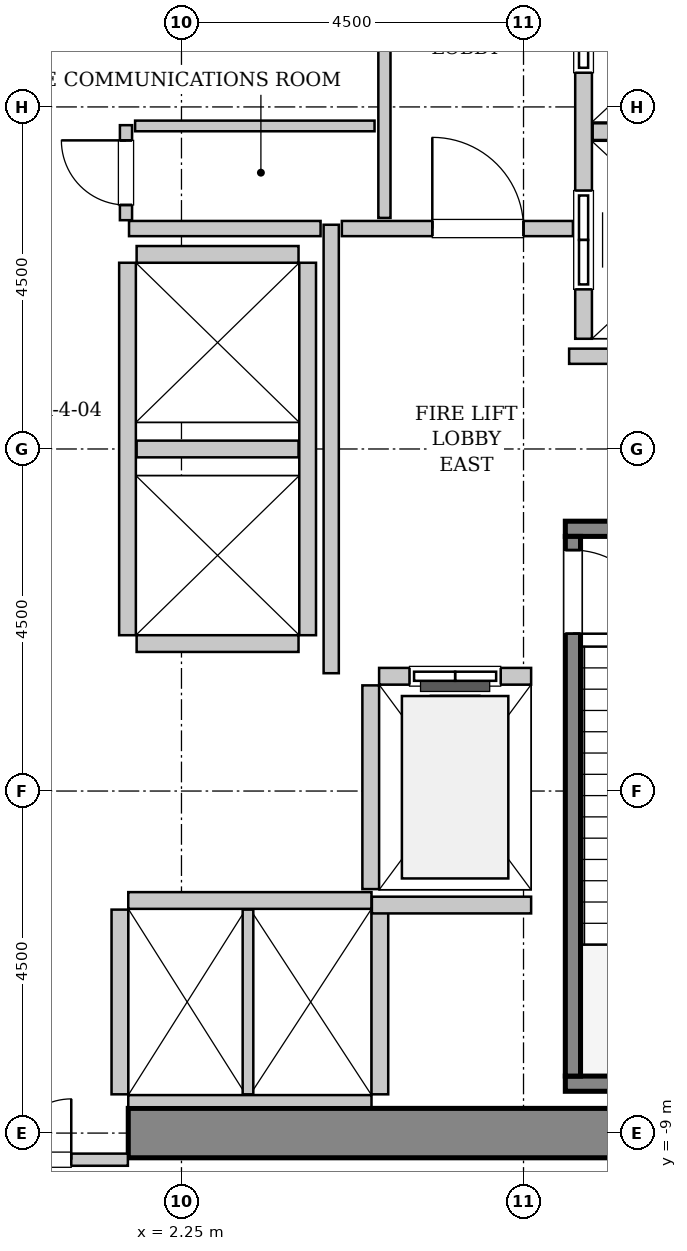
"""IFC4 building model, lengths in metres.
Left out: names, types, materials, properties, quantities, classifications, styles, units other than length and angle.
Written with IfcOpenShell. Run it as: python <this file> out.ifc"""

import sys

from ifc_helpers import new_model, si_unit, direction, frame, frame_2d, origin, place, context, subcontext, project, spatial, rectangle, extrude, source, transform, mapped, element, fill, save


model = new_model("IFC4")
c1 = context("Model", 3, precision=1e-05, world=origin(), true_north=direction((0.0, 1.0)))
c2 = subcontext(c1, "Body", "Model", "MODEL_VIEW")
j1 = project(units=[si_unit("LENGTHUNIT", "METRE"), si_unit("PLANEANGLEUNIT", "RADIAN")], contexts=[c1])
p1 = place(None, origin())
s1 = spatial("IfcSite", under=j1, at=p1, CompositionType="ELEMENT")
p2 = place(p1, origin())
s2 = spatial("IfcBuilding", under=s1, at=p2, CompositionType="ELEMENT")
p3 = place(p2, frame((0.0, 0.0, 16.8)))
s3 = spatial("IfcBuildingStorey", under=s2, at=p3, CompositionType="ELEMENT", Elevation=16.8)
m1 = source(origin(), c2, "Body", "SweptSolid", [
    extrude(rectangle(XDim=10.025, YDim=0.65, at=frame_2d((5.012, 0.0))), origin(), (0.0, 0.0, 1.0), 5.4),
])
p4 = place(p3, frame((1.55, -9.0, 0.0), z_axis=(0.0, 0.0, 1.0), x_axis=(1.0, 0.0, 0.0)))
e1 = element("IfcWall", 1, at=p4, inside=s3, PredefinedType="SHEAR", context=c2, shape_type="MappedRepresentation", body=[
    mapped(m1, transform((0.0, 0.0, 0.0), x_axis=(1.0, 0.0, 0.0), y_axis=(0.0, 1.0, 0.0), z_axis=(0.0, 0.0, 1.0), scale=1.0)),
])
m2 = source(origin(), c2, "Body", "SweptSolid", [
    extrude(rectangle(XDim=3.4, YDim=0.2, at=frame_2d((1.7, 0.0))), origin(), (0.0, 0.0, 1.0), 5.4),
])
p5 = place(p3, frame((7.3, -1.05, 0.0), z_axis=(0.0, 0.0, 1.0), x_axis=(1.0, 0.0, 0.0)))
e2 = element("IfcWall", 2, at=p5, inside=s3, PredefinedType="SOLIDWALL", context=c2, shape_type="MappedRepresentation", body=[
    mapped(m2, transform((0.0, 0.0, 0.0), x_axis=(1.0, 0.0, 0.0), y_axis=(0.0, 1.0, 0.0), z_axis=(0.0, 0.0, 1.0), scale=1.0)),
])
m3 = source(origin(), c2, "Body", "SweptSolid", [
    extrude(rectangle(XDim=3.63, YDim=0.2, at=frame_2d((1.815, 0.0))), origin(), (0.0, 0.0, 1.0), 5.4),
])
p6 = place(p3, frame((7.3, -8.35, 0.0), z_axis=(0.0, 0.0, 1.0), x_axis=(1.0, 0.0, 0.0)))
e3 = element("IfcWall", 3, at=p6, inside=s3, PredefinedType="SOLIDWALL", context=c2, shape_type="MappedRepresentation", body=[
    mapped(m3, transform((0.0, 0.0, 0.0), x_axis=(1.0, 0.0, 0.0), y_axis=(0.0, 1.0, 0.0), z_axis=(0.0, 0.0, 1.0), scale=1.0)),
])
m4 = source(origin(), c2, "Body", "SweptSolid", [
    extrude(rectangle(XDim=7.1, YDim=0.2, at=frame_2d((3.55, 0.0))), origin(), (0.0, 0.0, 1.0), 5.4),
])
p7 = place(p3, frame((7.4, -1.15, 0.0), z_axis=(0.0, 0.0, 1.0), x_axis=(0.0, -1.0, 0.0)))
e4 = element("IfcWall", 4, at=p7, inside=s3, PredefinedType="SOLIDWALL", context=c2, shape_type="MappedRepresentation", body=[
    mapped(m4, transform((0.0, 0.0, 0.0), x_axis=(1.0, 0.0, 0.0), y_axis=(0.0, 1.0, 0.0), z_axis=(0.0, 0.0, 1.0), scale=1.0)),
])
p8 = place(p7, frame((0.18, 0.0, 0.0)))
e5 = element("IfcOpeningElement", 5, at=p8, cuts=e4, PredefinedType="OPENING", context=c2, shape_type="SweptSolid", body=[
    extrude(rectangle(XDim=1.1, YDim=2.15, at=frame_2d((0.55, 1.075))), frame((0.0, 0.11, 0.0), z_axis=(0.0, -1.0, 0.0), x_axis=(1.0, 0.0, 0.0)), (0.0, 0.0, 1.0), 0.22),
])
m5 = source(origin(), c2, "Body", "SweptSolid", [
    extrude(rectangle(XDim=2.0, YDim=0.22, at=frame_2d((1.0, 0.0))), origin(), (0.0, 0.0, 1.0), 5.085),
])
p9 = place(p3, frame((6.85, -2.99, 0.0), z_axis=(0.0, 0.0, 1.0), x_axis=(-1.0, 0.0, 0.0)))
e6 = element("IfcWall", 6, at=p9, inside=s3, PredefinedType="SOLIDWALL", context=c2, shape_type="MappedRepresentation", body=[
    mapped(m5, transform((0.0, 0.0, 0.0), x_axis=(1.0, 0.0, 0.0), y_axis=(0.0, 1.0, 0.0), z_axis=(0.0, 0.0, 1.0), scale=1.0)),
])
p10 = place(p9, frame((0.4, 0.0, 0.0)))
e7 = element("IfcOpeningElement", 7, at=p10, cuts=e6, PredefinedType="OPENING", context=c2, shape_type="SweptSolid", body=[
    extrude(rectangle(XDim=1.2, YDim=2.2, at=frame_2d((0.6, 1.1))), frame((0.0, 0.12, 0.0), z_axis=(0.0, -1.0, 0.0), x_axis=(1.0, 0.0, 0.0)), (0.0, 0.0, 1.0), 0.24),
])
m6 = source(origin(), c2, "Body", "SweptSolid", [
    extrude(rectangle(XDim=2.68, YDim=0.22, at=frame_2d((1.34, 0.0))), origin(), (0.0, 0.0, 1.0), 5.085),
])
p11 = place(p3, frame((4.74, -3.11, 0.0), z_axis=(0.0, 0.0, 1.0), x_axis=(0.0, -1.0, 0.0)))
e8 = element("IfcWall", 8, at=p11, inside=s3, PredefinedType="SOLIDWALL", context=c2, shape_type="MappedRepresentation", body=[
    mapped(m6, transform((0.0, 0.0, 0.0), x_axis=(1.0, 0.0, 0.0), y_axis=(0.0, 1.0, 0.0), z_axis=(0.0, 0.0, 1.0), scale=1.0)),
])
m7 = source(origin(), c2, "Body", "SweptSolid", [
    extrude(rectangle(XDim=5.45, YDim=0.22, at=frame_2d((2.725, 0.0))), origin(), (0.0, 0.0, 1.0), 5.085),
])
p12 = place(p3, frame((7.54, 6.9, 0.0), z_axis=(0.0, 0.0, 1.0), x_axis=(0.0, -1.0, 0.0)))
e9 = element("IfcWall", 9, at=p12, inside=s3, PredefinedType="SOLIDWALL", context=c2, shape_type="MappedRepresentation", body=[
    mapped(m7, transform((0.0, 0.0, 0.0), x_axis=(1.0, 0.0, 0.0), y_axis=(0.0, 1.0, 0.0), z_axis=(0.0, 0.0, 1.0), scale=1.0)),
])
p13 = place(p12, frame((3.5, 0.0, 0.0)))
e10 = element("IfcOpeningElement", 10, at=p13, cuts=e9, PredefinedType="OPENING", context=c2, shape_type="SweptSolid", body=[
    extrude(rectangle(XDim=1.3, YDim=2.3, at=frame_2d((0.65, 1.15))), frame((0.0, 0.12, 0.0), z_axis=(0.0, -1.0, 0.0), x_axis=(1.0, 0.0, 0.0)), (0.0, 0.0, 1.0), 0.24),
])
p14 = place(p12, frame((0.65, 0.0, 0.0)))
e11 = element("IfcOpeningElement", 11, at=p14, cuts=e9, PredefinedType="OPENING", context=c2, shape_type="SweptSolid", body=[
    extrude(rectangle(XDim=1.3, YDim=2.3, at=frame_2d((0.65, 1.15))), frame((0.0, 0.12, 0.0), z_axis=(0.0, -1.0, 0.0), x_axis=(1.0, 0.0, 0.0)), (0.0, 0.0, 1.0), 0.24),
])
m8 = source(origin(), c2, "Body", "SweptSolid", [
    extrude(rectangle(XDim=2.78, YDim=0.22, at=frame_2d((1.39, 0.0))), origin(), (0.0, 0.0, 1.0), 5.085),
])
p15 = place(p3, frame((7.66, 4.175, 0.0), z_axis=(0.0, 0.0, 1.0), x_axis=(1.0, 0.0, 0.0)))
e12 = element("IfcWall", 12, at=p15, inside=s3, PredefinedType="SOLIDWALL", context=c2, shape_type="MappedRepresentation", body=[
    mapped(m8, transform((0.0, 0.0, 0.0), x_axis=(1.0, 0.0, 0.0), y_axis=(0.0, 1.0, 0.0), z_axis=(0.0, 0.0, 1.0), scale=1.0)),
])
m9 = source(origin(), c2, "Body", "SweptSolid", [
    extrude(rectangle(XDim=3.2, YDim=0.22, at=frame_2d((1.6, 0.0))), origin(), (0.0, 0.0, 1.0), 5.085),
])
p16 = place(p3, frame((4.75, -5.94, 0.0), z_axis=(0.0, 0.0, 1.0), x_axis=(-1.0, 0.0, 0.0)))
e13 = element("IfcWall", 13, at=p16, inside=s3, PredefinedType="SOLIDWALL", context=c2, shape_type="MappedRepresentation", body=[
    mapped(m9, transform((0.0, 0.0, 0.0), x_axis=(1.0, 0.0, 0.0), y_axis=(0.0, 1.0, 0.0), z_axis=(0.0, 0.0, 1.0), scale=1.0)),
])
m10 = source(origin(), c2, "Body", "SweptSolid", [
    extrude(rectangle(XDim=3.2, YDim=0.16, at=frame_2d((1.6, 0.0))), origin(), (0.0, 0.0, 1.0), 3.975),
])
p17 = place(p3, frame((1.55, -8.58, 0.0), z_axis=(0.0, 0.0, 1.0), x_axis=(1.0, 0.0, 0.0)))
e14 = element("IfcWall", 14, at=p17, inside=s3, PredefinedType="PARTITIONING", context=c2, shape_type="MappedRepresentation", body=[
    mapped(m10, transform((0.0, 0.0, 0.0), x_axis=(1.0, 0.0, 0.0), y_axis=(0.0, 1.0, 0.0), z_axis=(0.0, 0.0, 1.0), scale=1.0)),
])
m11 = source(origin(), c2, "Body", "SweptSolid", [
    extrude(rectangle(XDim=2.43, YDim=0.22, at=frame_2d((1.215, 0.0))), origin(), (0.0, 0.0, 1.0), 5.085),
])
p18 = place(p3, frame((1.44, -6.06, 0.0), z_axis=(0.0, 0.0, 1.0), x_axis=(0.0, -1.0, 0.0)))
e15 = element("IfcWall", 15, at=p18, inside=s3, PredefinedType="SOLIDWALL", context=c2, shape_type="MappedRepresentation", body=[
    mapped(m11, transform((0.0, 0.0, 0.0), x_axis=(1.0, 0.0, 0.0), y_axis=(0.0, 1.0, 0.0), z_axis=(0.0, 0.0, 1.0), scale=1.0)),
])
m12 = source(origin(), c2, "Body", "SweptSolid", [
    extrude(rectangle(XDim=2.43, YDim=0.14, at=frame_2d((1.215, 0.0))), origin(), (0.0, 0.0, 1.0), 5.085),
])
p19 = place(p3, frame((3.125, -8.49, 0.0), z_axis=(0.0, 0.0, 1.0), x_axis=(0.0, 1.0, 0.0)))
e16 = element("IfcWall", 16, at=p19, inside=s3, PredefinedType="PARTITIONING", context=c2, shape_type="MappedRepresentation", body=[
    mapped(m12, transform((0.0, 0.0, 0.0), x_axis=(1.0, 0.0, 0.0), y_axis=(0.0, 1.0, 0.0), z_axis=(0.0, 0.0, 1.0), scale=1.0)),
])
p20 = place(p3, frame((4.86, -8.49, 0.0), z_axis=(0.0, 0.0, 1.0), x_axis=(0.0, 1.0, 0.0)))
e17 = element("IfcWall", 17, at=p20, inside=s3, PredefinedType="SOLIDWALL", context=c2, shape_type="MappedRepresentation", body=[
    mapped(m11, transform((0.0, 0.0, 0.0), x_axis=(1.0, 0.0, 0.0), y_axis=(0.0, 1.0, 0.0), z_axis=(0.0, 0.0, 1.0), scale=1.0)),
])
m13 = source(origin(), c2, "Body", "SweptSolid", [
    extrude(rectangle(XDim=4.9, YDim=0.22, at=frame_2d((2.45, 0.0))), origin(), (0.0, 0.0, 1.0), 5.085),
])
for number, where, z_axis, x_axis in (
    (18, (1.54, 2.45, 0.0), (0.0, 0.0, 1.0), (0.0, -1.0, 0.0)),
    (19, (3.91, -2.45, 0.0), (0.0, 0.0, 1.0), (0.0, 1.0, 0.0)),
):
    element("IfcWall", number, at=place(p3, frame(where, z_axis=z_axis, x_axis=x_axis)), inside=s3, PredefinedType="SOLIDWALL", context=c2, shape_type="MappedRepresentation", body=[
        mapped(m13, transform((0.0, 0.0, 0.0), x_axis=(1.0, 0.0, 0.0), y_axis=(0.0, 1.0, 0.0), z_axis=(0.0, 0.0, 1.0), scale=1.0)),
    ])
m14 = source(origin(), c2, "Body", "SweptSolid", [
    extrude(rectangle(XDim=2.13, YDim=0.22, at=frame_2d((1.065, 0.0))), origin(), (0.0, 0.0, 1.0), 5.085),
])
for number, where, z_axis, x_axis in (
    (20, (1.66, -2.56, 0.0), (0.0, 0.0, 1.0), (1.0, 0.0, 0.0)),
    (21, (1.66, 0.0, 0.0), (0.0, 0.0, 1.0), (1.0, 0.0, 0.0)),
    (22, (3.79, 2.56, 0.0), (0.0, 0.0, 1.0), (-1.0, 0.0, 0.0)),
):
    element("IfcWall", number, at=place(p3, frame(where, z_axis=z_axis, x_axis=x_axis)), inside=s3, PredefinedType="SOLIDWALL", context=c2, shape_type="MappedRepresentation", body=[
        mapped(m14, transform((0.0, 0.0, 0.0), x_axis=(1.0, 0.0, 0.0), y_axis=(0.0, 1.0, 0.0), z_axis=(0.0, 0.0, 1.0), scale=1.0)),
    ])
m15 = source(origin(), c2, "Body", "SweptSolid", [
    extrude(rectangle(XDim=2.095, YDim=0.22, at=frame_2d((1.048, 0.0))), origin(), (0.0, 0.0, 1.0), 5.085),
])
p21 = place(p3, frame((4.755, -6.0, 0.0), z_axis=(0.0, 0.0, 1.0), x_axis=(1.0, 0.0, 0.0)))
e23 = element("IfcWall", 23, at=p21, inside=s3, PredefinedType="SOLIDWALL", context=c2, shape_type="MappedRepresentation", body=[
    mapped(m15, transform((0.0, 0.0, 0.0), x_axis=(1.0, 0.0, 0.0), y_axis=(0.0, 1.0, 0.0), z_axis=(0.0, 0.0, 1.0), scale=1.0)),
])
m16 = source(origin(), c2, "Body", "SweptSolid", [
    extrude(rectangle(XDim=5.9, YDim=0.2, at=frame_2d((2.95, 0.0))), origin(), (0.0, 0.0, 1.0), 5.085),
])
p22 = place(p3, frame((4.22, -2.95, 0.0), z_axis=(0.0, 0.0, 1.0), x_axis=(0.0, 1.0, 0.0)))
e24 = element("IfcWall", 24, at=p22, inside=s3, PredefinedType="PARTITIONING", context=c2, shape_type="MappedRepresentation", body=[
    mapped(m16, transform((0.0, 0.0, 0.0), x_axis=(1.0, 0.0, 0.0), y_axis=(0.0, 1.0, 0.0), z_axis=(0.0, 0.0, 1.0), scale=1.0)),
])
m17 = source(origin(), c2, "Body", "SweptSolid", [
    extrude(rectangle(XDim=2.52, YDim=0.2, at=frame_2d((1.26, 0.0))), origin(), (0.0, 0.0, 1.0), 5.085),
])
p23 = place(p3, frame((1.56, 2.9, 0.0), z_axis=(0.0, 0.0, 1.0), x_axis=(1.0, 0.0, 0.0)))
e25 = element("IfcWall", 25, at=p23, inside=s3, PredefinedType="PARTITIONING", context=c2, shape_type="MappedRepresentation", body=[
    mapped(m17, transform((0.0, 0.0, 0.0), x_axis=(1.0, 0.0, 0.0), y_axis=(0.0, 1.0, 0.0), z_axis=(0.0, 0.0, 1.0), scale=1.0)),
])
m18 = source(origin(), c2, "Body", "SweptSolid", [
    extrude(rectangle(XDim=3.04, YDim=0.2, at=frame_2d((1.52, 0.0))), origin(), (0.0, 0.0, 1.0), 5.085),
])
p24 = place(p3, frame((4.36, 2.9, 0.0), z_axis=(0.0, 0.0, 1.0), x_axis=(1.0, 0.0, 0.0)))
e26 = element("IfcWall", 26, at=p24, inside=s3, PredefinedType="PARTITIONING", context=c2, shape_type="MappedRepresentation", body=[
    mapped(m18, transform((0.0, 0.0, 0.0), x_axis=(1.0, 0.0, 0.0), y_axis=(0.0, 1.0, 0.0), z_axis=(0.0, 0.0, 1.0), scale=1.0)),
])
p25 = place(p24, frame((1.19, 0.0, 0.0)))
e27 = element("IfcOpeningElement", 27, at=p25, cuts=e26, PredefinedType="OPENING", context=c2, shape_type="SweptSolid", body=[
    extrude(rectangle(XDim=1.2, YDim=2.15, at=frame_2d((0.6, 1.075))), frame((0.0, 0.11, 0.0), z_axis=(0.0, -1.0, 0.0), x_axis=(1.0, 0.0, 0.0)), (0.0, 0.0, 1.0), 0.22),
])
m19 = source(origin(), c2, "Body", "SweptSolid", [
    extrude(rectangle(XDim=4.11, YDim=0.2, at=frame_2d((2.055, 0.0))), origin(), (0.0, 0.0, 1.0), 5.085),
])
p26 = place(p3, frame((7.35, 1.22, 0.0), z_axis=(0.0, 0.0, 1.0), x_axis=(1.0, 0.0, 0.0)))
e28 = element("IfcWall", 28, at=p26, inside=s3, PredefinedType="PARTITIONING", context=c2, shape_type="MappedRepresentation", body=[
    mapped(m19, transform((0.0, 0.0, 0.0), x_axis=(1.0, 0.0, 0.0), y_axis=(0.0, 1.0, 0.0), z_axis=(0.0, 0.0, 1.0), scale=1.0)),
])
m20 = source(origin(), c2, "Body", "SweptSolid", [
    extrude(rectangle(XDim=3.09, YDim=0.16, at=frame_2d((1.545, 0.0))), origin(), (0.0, 0.0, 1.0), 3.975),
])
p27 = place(p3, frame((-1.545, -9.35, 0.0), z_axis=(0.0, 0.0, 1.0), x_axis=(1.0, 0.0, 0.0)))
e29 = element("IfcWall", 29, at=p27, inside=s3, PredefinedType="PARTITIONING", context=c2, shape_type="MappedRepresentation", body=[
    mapped(m20, transform((0.0, 0.0, 0.0), x_axis=(1.0, 0.0, 0.0), y_axis=(0.0, 1.0, 0.0), z_axis=(0.0, 0.0, 1.0), scale=1.0)),
])
p28 = place(p27, frame((0.745, 0.0, 0.0)))
e30 = element("IfcOpeningElement", 30, at=p28, cuts=e29, PredefinedType="OPENING", context=c2, shape_type="SweptSolid", body=[
    extrude(rectangle(XDim=1.6, YDim=2.3, at=frame_2d((0.8, 1.15))), frame((0.0, 0.09, 0.0), z_axis=(0.0, -1.0, 0.0), x_axis=(1.0, 0.0, 0.0)), (0.0, 0.0, 1.0), 0.18),
])
m21 = source(origin(), c2, "Body", "SweptSolid", [
    extrude(rectangle(XDim=3.015, YDim=0.16, at=frame_2d((1.507, 0.0))), origin(), (0.0, 0.0, 1.0), 5.085),
])
p29 = place(p3, frame((4.92, 3.04, 0.0), z_axis=(0.0, 0.0, 1.0), x_axis=(0.0, 1.0, 0.0)))
e31 = element("IfcWall", 31, at=p29, inside=s3, PredefinedType="PARTITIONING", context=c2, shape_type="MappedRepresentation", body=[
    mapped(m21, transform((0.0, 0.0, 0.0), x_axis=(1.0, 0.0, 0.0), y_axis=(0.0, 1.0, 0.0), z_axis=(0.0, 0.0, 1.0), scale=1.0)),
])
m22 = source(origin(), c2, "Body", "SweptSolid", [
    extrude(rectangle(XDim=1.25, YDim=0.16, at=frame_2d((0.625, 0.0))), origin(), (0.0, 0.0, 1.0), 5.085),
])
p30 = place(p3, frame((1.52, 3.01, 0.0), z_axis=(0.0, 0.0, 1.0), x_axis=(0.0, 1.0, 0.0)))
e32 = element("IfcWall", 32, at=p30, inside=s3, PredefinedType="PARTITIONING", context=c2, shape_type="MappedRepresentation", body=[
    mapped(m22, transform((0.0, 0.0, 0.0), x_axis=(1.0, 0.0, 0.0), y_axis=(0.0, 1.0, 0.0), z_axis=(0.0, 0.0, 1.0), scale=1.0)),
])
p31 = place(p30, frame((0.2, 0.0, 0.0)))
e33 = element("IfcOpeningElement", 33, at=p31, cuts=e32, PredefinedType="OPENING", context=c2, shape_type="SweptSolid", body=[
    extrude(rectangle(XDim=0.85, YDim=2.1, at=frame_2d((0.425, 1.05))), frame((0.0, 0.09, 0.0), z_axis=(0.0, -1.0, 0.0), x_axis=(1.0, 0.0, 0.0)), (0.0, 0.0, 1.0), 0.18),
])
m23 = source(origin(), c2, "Body", "SweptSolid", [
    extrude(rectangle(XDim=3.15, YDim=0.14, at=frame_2d((1.575, 0.0))), origin(), (0.0, 0.0, 1.0), 5.085),
])
p32 = place(p3, frame((1.64, 4.25, 0.0), z_axis=(0.0, 0.0, 1.0), x_axis=(1.0, 0.0, 0.0)))
e34 = element("IfcWall", 34, at=p32, inside=s3, PredefinedType="PARTITIONING", context=c2, shape_type="MappedRepresentation", body=[
    mapped(m23, transform((0.0, 0.0, 0.0), x_axis=(1.0, 0.0, 0.0), y_axis=(0.0, 1.0, 0.0), z_axis=(0.0, 0.0, 1.0), scale=1.0)),
])
m24 = source(origin(), c2, "Body", "SweptSolid", [
    extrude(rectangle(XDim=1.1, YDim=2.15, at=frame_2d((0.55, 1.075))), frame((0.0, 0.025, 0.0), z_axis=(0.0, -1.0, 0.0), x_axis=(1.0, 0.0, 0.0)), (0.0, 0.0, 1.0), 0.05),
])
p33 = place(p8, origin())
e35 = element("IfcDoor", 35, at=p33, inside=s3, OperationType="SINGLE_SWING_RIGHT", PredefinedType="DOOR", context=c2, shape_type="MappedRepresentation", body=[
    mapped(m24, transform((0.0, 0.0, 0.0), x_axis=(1.0, 0.0, 0.0), y_axis=(0.0, 1.0, 0.0), z_axis=(0.0, 0.0, 1.0), scale=1.0)),
])
fill(e5, e35)
m25 = source(origin(), c2, "Body", "SweptSolid", [
    extrude(rectangle(XDim=1.2, YDim=2.2, at=frame_2d((0.6, 1.1))), frame((0.0, 0.025, 0.0), z_axis=(0.0, -1.0, 0.0), x_axis=(1.0, 0.0, 0.0)), (0.0, 0.0, 1.0), 0.05),
])
p34 = place(p10, origin())
e36 = element("IfcDoor", 36, at=p34, inside=s3, OperationType="SLIDING_TO_LEFT", PredefinedType="DOOR", context=c2, shape_type="MappedRepresentation", body=[
    mapped(m25, transform((0.0, 0.0, 0.0), x_axis=(1.0, 0.0, 0.0), y_axis=(0.0, 1.0, 0.0), z_axis=(0.0, 0.0, 1.0), scale=1.0)),
])
fill(e7, e36)
m26 = source(origin(), c2, "Body", "SweptSolid", [
    extrude(rectangle(XDim=1.3, YDim=2.3, at=frame_2d((0.65, 1.15))), frame((0.0, 0.025, 0.0), z_axis=(0.0, -1.0, 0.0), x_axis=(1.0, 0.0, 0.0)), (0.0, 0.0, 1.0), 0.05),
])
p35 = place(p13, origin())
e37 = element("IfcDoor", 37, at=p35, inside=s3, OperationType="SLIDING_TO_RIGHT", PredefinedType="DOOR", context=c2, shape_type="MappedRepresentation", body=[
    mapped(m26, transform((0.0, 0.0, 0.0), x_axis=(1.0, 0.0, 0.0), y_axis=(0.0, 1.0, 0.0), z_axis=(0.0, 0.0, 1.0), scale=1.0)),
])
fill(e10, e37)
p36 = place(p14, origin())
e38 = element("IfcDoor", 38, at=p36, inside=s3, OperationType="SLIDING_TO_RIGHT", PredefinedType="DOOR", context=c2, shape_type="MappedRepresentation", body=[
    mapped(m26, transform((0.0, 0.0, 0.0), x_axis=(1.0, 0.0, 0.0), y_axis=(0.0, 1.0, 0.0), z_axis=(0.0, 0.0, 1.0), scale=1.0)),
])
fill(e11, e38)
m27 = source(origin(), c2, "Body", "SweptSolid", [
    extrude(rectangle(XDim=1.2, YDim=2.15, at=frame_2d((0.6, 1.075))), frame((0.0, 0.025, 0.0), z_axis=(0.0, -1.0, 0.0), x_axis=(1.0, 0.0, 0.0)), (0.0, 0.0, 1.0), 0.05),
])
p37 = place(p25, origin())
e39 = element("IfcDoor", 39, at=p37, inside=s3, OperationType="SINGLE_SWING_LEFT", PredefinedType="DOOR", context=c2, shape_type="MappedRepresentation", body=[
    mapped(m27, transform((0.0, 0.0, 0.0), x_axis=(1.0, 0.0, 0.0), y_axis=(0.0, 1.0, 0.0), z_axis=(0.0, 0.0, 1.0), scale=1.0)),
])
fill(e27, e39)
m28 = source(origin(), c2, "Body", "SweptSolid", [
    extrude(rectangle(XDim=1.6, YDim=2.3, at=frame_2d((0.8, 1.15))), frame((0.0, 0.025, 0.0), z_axis=(0.0, -1.0, 0.0), x_axis=(1.0, 0.0, 0.0)), (0.0, 0.0, 1.0), 0.05),
])
p38 = place(p28, origin())
e40 = element("IfcDoor", 40, at=p38, inside=s3, OperationType="DOUBLE_DOOR_SINGLE_SWING", PredefinedType="DOOR", context=c2, shape_type="MappedRepresentation", body=[
    mapped(m28, transform((0.0, 0.0, 0.0), x_axis=(1.0, 0.0, 0.0), y_axis=(0.0, 1.0, 0.0), z_axis=(0.0, 0.0, 1.0), scale=1.0)),
])
fill(e30, e40)
m29 = source(origin(), c2, "Body", "SweptSolid", [
    extrude(rectangle(XDim=0.85, YDim=2.1, at=frame_2d((0.425, 1.05))), frame((0.0, 0.025, 0.0), z_axis=(0.0, -1.0, 0.0), x_axis=(1.0, 0.0, 0.0)), (0.0, 0.0, 1.0), 0.05),
])
p39 = place(p31, origin())
e41 = element("IfcDoor", 41, at=p39, inside=s3, OperationType="SINGLE_SWING_RIGHT", PredefinedType="DOOR", context=c2, shape_type="MappedRepresentation", body=[
    mapped(m29, transform((0.0, 0.0, 0.0), x_axis=(1.0, 0.0, 0.0), y_axis=(0.0, 1.0, 0.0), z_axis=(0.0, 0.0, 1.0), scale=1.0)),
])
fill(e33, e41)
save(model, sys.argv[1])
